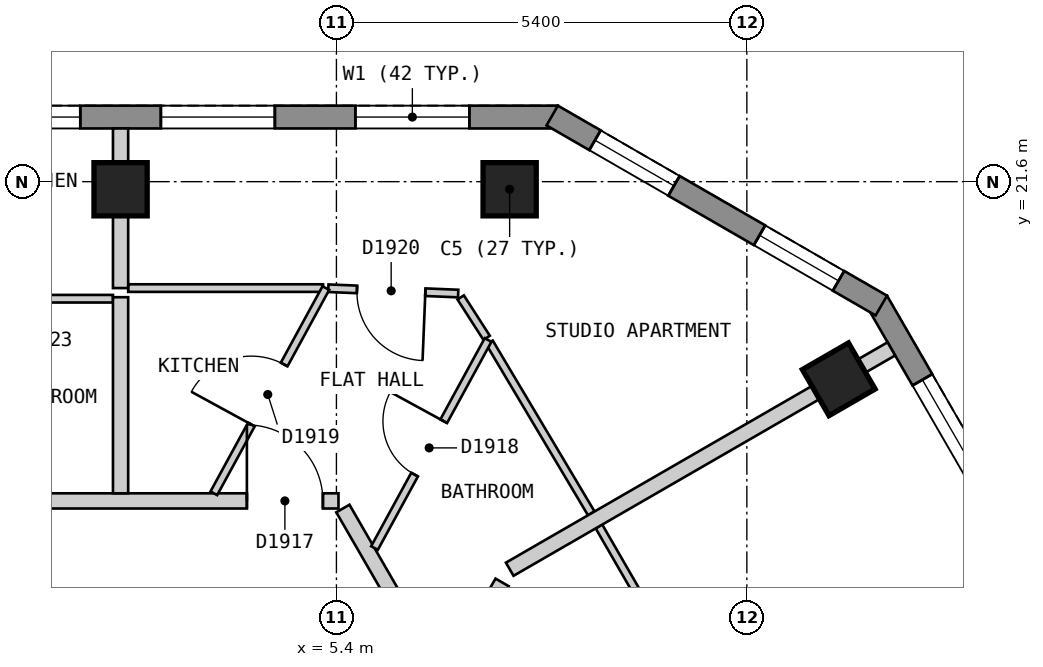
"""IFC4 building model, lengths in metres.
Left out: names, types, materials, properties, quantities, classifications, styles, units other than length and angle.
Written with IfcOpenShell. Run it as: python <this file> out.ifc"""

import sys

from ifc_helpers import new_model, si_unit, direction, frame, frame_2d, origin, origin_2d, place, context, subcontext, project, spatial, polyline, rectangle, outline, extrude, element, fill, save


model = new_model("IFC4")
c1 = context("Model", 3, precision=1e-05, world=origin(), true_north=direction((0.0, 1.0)))
c2 = subcontext(c1, "Body", "Model", "MODEL_VIEW")
j1 = project(units=[si_unit("LENGTHUNIT", "METRE"), si_unit("PLANEANGLEUNIT", "RADIAN")], contexts=[c1])
p1 = place(None, origin())
s1 = spatial("IfcSite", under=j1, at=p1, CompositionType="ELEMENT")
p2 = place(p1, origin())
s2 = spatial("IfcBuilding", under=s1, at=p2, CompositionType="ELEMENT")
p3 = place(p2, frame((0.0, 0.0, 226.8)))
s3 = spatial("IfcBuildingStorey", under=s2, at=p3, CompositionType="ELEMENT", Elevation=226.8)
for number, where, z_axis, x_axis in (
    (1, (7.679, 21.5, 0.0), (0.0, 0.0, 1.0), (-1.0, 0.0, 0.0)),
    (2, (2.56, 21.5, 0.0), (0.0, 0.0, 1.0), (-1.0, 0.0, 0.0)),
    (3, (12.009, 19.0, 0.0), (0.0, 0.0, 1.0), (-0.5, 0.866, 0.0)),
):
    element("IfcColumn", number, at=place(p3, frame(where, z_axis=z_axis, x_axis=x_axis)), inside=s3, PredefinedType="COLUMN", context=c2, shape_type="SweptSolid", body=[
        extrude(rectangle(XDim=0.7, YDim=0.7, at=origin_2d()), origin(), (0.0, 0.0, 1.0), 3.0),
    ])
p4 = place(p3, frame((8.314, 22.45, 0.0), z_axis=(0.0, 0.0, 1.0), x_axis=(-1.0, 0.0, 0.0)))
e4 = element("IfcWall", 4, at=p4, inside=s3, PredefinedType="SOLIDWALL", context=c2, shape_type="SweptSolid", body=[
    extrude(outline(polyline([(0.0, -0.15), (16.628, -0.15), (16.548, 0.15), (0.08, 0.15), (0.0, -0.15)])), origin(), (0.0, 0.0, 1.0), 2.7),
])
p5 = place(p4, frame((1.165, 0.0, 0.15)))
e5 = element("IfcOpeningElement", 5, at=p5, cuts=e4, PredefinedType="OPENING", context=c2, shape_type="SweptSolid", body=[
    extrude(rectangle(XDim=1.5, YDim=2.1, at=frame_2d((0.75, 1.05))), frame((0.0, 0.16, 0.0), z_axis=(0.0, -1.0, 0.0), x_axis=(1.0, 0.0, 0.0)), (0.0, 0.0, 1.0), 0.32),
])
p6 = place(p4, frame((3.724, 0.0, 0.15)))
e6 = element("IfcOpeningElement", 6, at=p6, cuts=e4, PredefinedType="OPENING", context=c2, shape_type="SweptSolid", body=[
    extrude(rectangle(XDim=1.5, YDim=2.1, at=frame_2d((0.75, 1.05))), frame((0.0, 0.16, 0.0), z_axis=(0.0, -1.0, 0.0), x_axis=(1.0, 0.0, 0.0)), (0.0, 0.0, 1.0), 0.32),
])
p7 = place(p4, frame((6.284, 0.0, 0.15)))
e7 = element("IfcOpeningElement", 7, at=p7, cuts=e4, PredefinedType="OPENING", context=c2, shape_type="SweptSolid", body=[
    extrude(rectangle(XDim=1.5, YDim=2.1, at=frame_2d((0.75, 1.05))), frame((0.0, 0.16, 0.0), z_axis=(0.0, -1.0, 0.0), x_axis=(1.0, 0.0, 0.0)), (0.0, 0.0, 1.0), 0.32),
])
p8 = place(p4, frame((8.843, 0.0, 0.15)))
e8 = element("IfcOpeningElement", 8, at=p8, cuts=e4, PredefinedType="OPENING", context=c2, shape_type="SweptSolid", body=[
    extrude(rectangle(XDim=1.5, YDim=2.1, at=frame_2d((0.75, 1.05))), frame((0.0, 0.16, 0.0), z_axis=(0.0, -1.0, 0.0), x_axis=(1.0, 0.0, 0.0)), (0.0, 0.0, 1.0), 0.32),
])
p9 = place(p4, frame((11.403, 0.0, 0.15)))
e9 = element("IfcOpeningElement", 9, at=p9, cuts=e4, PredefinedType="OPENING", context=c2, shape_type="SweptSolid", body=[
    extrude(rectangle(XDim=1.5, YDim=2.1, at=frame_2d((0.75, 1.05))), frame((0.0, 0.16, 0.0), z_axis=(0.0, -1.0, 0.0), x_axis=(1.0, 0.0, 0.0)), (0.0, 0.0, 1.0), 0.32),
])
p10 = place(p4, frame((13.962, 0.0, 0.15)))
e10 = element("IfcOpeningElement", 10, at=p10, cuts=e4, PredefinedType="OPENING", context=c2, shape_type="SweptSolid", body=[
    extrude(rectangle(XDim=1.5, YDim=2.1, at=frame_2d((0.75, 1.05))), frame((0.0, 0.16, 0.0), z_axis=(0.0, -1.0, 0.0), x_axis=(1.0, 0.0, 0.0)), (0.0, 0.0, 1.0), 0.32),
])
p11 = place(p3, frame((23.599, 0.825, 0.0), z_axis=(0.0, 0.0, 1.0), x_axis=(-0.500003656944, 0.866023292436, 0.0)))
e11 = element("IfcWall", 11, at=p11, inside=s3, PredefinedType="SOLIDWALL", context=c2, shape_type="SweptSolid", body=[
    extrude(outline(polyline([(0.0, -0.15), (22.17, -0.15), (22.09, 0.15), (0.08, 0.15), (0.0, -0.15)])), origin(), (0.0, 0.0, 1.0), 2.7),
])
p12 = place(p11, frame((1.191, 0.0, 0.15)))
e12 = element("IfcOpeningElement", 12, at=p12, cuts=e11, PredefinedType="OPENING", context=c2, shape_type="SweptSolid", body=[
    extrude(rectangle(XDim=1.5, YDim=2.1, at=frame_2d((0.75, 1.05))), frame((0.0, 0.16, 0.0), z_axis=(0.0, -1.0, 0.0), x_axis=(1.0, 0.0, 0.0)), (0.0, 0.0, 1.0), 0.32),
])
p13 = place(p11, frame((3.804, 0.0, 0.15)))
e13 = element("IfcOpeningElement", 13, at=p13, cuts=e11, PredefinedType="OPENING", context=c2, shape_type="SweptSolid", body=[
    extrude(rectangle(XDim=1.5, YDim=2.1, at=frame_2d((0.75, 1.05))), frame((0.0, 0.16, 0.0), z_axis=(0.0, -1.0, 0.0), x_axis=(1.0, 0.0, 0.0)), (0.0, 0.0, 1.0), 0.32),
])
p14 = place(p11, frame((6.417, 0.0, 0.15)))
e14 = element("IfcOpeningElement", 14, at=p14, cuts=e11, PredefinedType="OPENING", context=c2, shape_type="SweptSolid", body=[
    extrude(rectangle(XDim=1.5, YDim=2.1, at=frame_2d((0.75, 1.05))), frame((0.0, 0.16, 0.0), z_axis=(0.0, -1.0, 0.0), x_axis=(1.0, 0.0, 0.0)), (0.0, 0.0, 1.0), 0.32),
])
p15 = place(p11, frame((9.029, 0.0, 0.15)))
e15 = element("IfcOpeningElement", 15, at=p15, cuts=e11, PredefinedType="OPENING", context=c2, shape_type="SweptSolid", body=[
    extrude(rectangle(XDim=1.5, YDim=2.1, at=frame_2d((0.75, 1.05))), frame((0.0, 0.16, 0.0), z_axis=(0.0, -1.0, 0.0), x_axis=(1.0, 0.0, 0.0)), (0.0, 0.0, 1.0), 0.32),
])
p16 = place(p11, frame((11.641, 0.0, 0.15)))
e16 = element("IfcOpeningElement", 16, at=p16, cuts=e11, PredefinedType="OPENING", context=c2, shape_type="SweptSolid", body=[
    extrude(rectangle(XDim=1.5, YDim=2.1, at=frame_2d((0.75, 1.05))), frame((0.0, 0.16, 0.0), z_axis=(0.0, -1.0, 0.0), x_axis=(1.0, 0.0, 0.0)), (0.0, 0.0, 1.0), 0.32),
])
p17 = place(p11, frame((14.254, 0.0, 0.15)))
e17 = element("IfcOpeningElement", 17, at=p17, cuts=e11, PredefinedType="OPENING", context=c2, shape_type="SweptSolid", body=[
    extrude(rectangle(XDim=1.5, YDim=2.1, at=frame_2d((0.75, 1.05))), frame((0.0, 0.16, 0.0), z_axis=(0.0, -1.0, 0.0), x_axis=(1.0, 0.0, 0.0)), (0.0, 0.0, 1.0), 0.32),
])
p18 = place(p11, frame((16.866, 0.0, 0.15)))
e18 = element("IfcOpeningElement", 18, at=p18, cuts=e11, PredefinedType="OPENING", context=c2, shape_type="SweptSolid", body=[
    extrude(rectangle(XDim=1.5, YDim=2.1, at=frame_2d((0.75, 1.05))), frame((0.0, 0.16, 0.0), z_axis=(0.0, -1.0, 0.0), x_axis=(1.0, 0.0, 0.0)), (0.0, 0.0, 1.0), 0.32),
])
p19 = place(p11, frame((19.479, 0.0, 0.15)))
e19 = element("IfcOpeningElement", 19, at=p19, cuts=e11, PredefinedType="OPENING", context=c2, shape_type="SweptSolid", body=[
    extrude(rectangle(XDim=1.5, YDim=2.1, at=frame_2d((0.75, 1.05))), frame((0.0, 0.16, 0.0), z_axis=(0.0, -1.0, 0.0), x_axis=(1.0, 0.0, 0.0)), (0.0, 0.0, 1.0), 0.32),
])
p20 = place(p3, frame((12.569, 19.97, 0.0), z_axis=(0.0, 0.0, 1.0), x_axis=(-0.866022959057, 0.500004234368, 0.0)))
e20 = element("IfcWall", 20, at=p20, inside=s3, PredefinedType="SOLIDWALL", context=c2, shape_type="SweptSolid", body=[
    extrude(outline(polyline([(0.0, -0.15), (5.0, -0.15), (4.92, 0.15), (0.08, 0.15), (0.0, -0.15)])), origin(), (0.0, 0.0, 1.0), 2.7),
])
p21 = place(p20, frame((0.65, 0.0, 0.15)))
e21 = element("IfcOpeningElement", 21, at=p21, cuts=e20, PredefinedType="OPENING", context=c2, shape_type="SweptSolid", body=[
    extrude(rectangle(XDim=1.2, YDim=2.1, at=frame_2d((0.6, 1.05))), frame((0.0, 0.16, 0.0), z_axis=(0.0, -1.0, 0.0), x_axis=(1.0, 0.0, 0.0)), (0.0, 0.0, 1.0), 0.32),
])
p22 = place(p20, frame((3.15, 0.0, 0.15)))
e22 = element("IfcOpeningElement", 22, at=p22, cuts=e20, PredefinedType="OPENING", context=c2, shape_type="SweptSolid", body=[
    extrude(rectangle(XDim=1.2, YDim=2.1, at=frame_2d((0.6, 1.05))), frame((0.0, 0.16, 0.0), z_axis=(0.0, -1.0, 0.0), x_axis=(1.0, 0.0, 0.0)), (0.0, 0.0, 1.0), 0.32),
])
p23 = place(p3, frame((5.485, 17.3, 0.0), z_axis=(0.0, 0.0, 1.0), x_axis=(0.499943285704, -0.866058145322, 0.0)))
e23 = element("IfcWall", 23, at=p23, inside=s3, PredefinedType="PARTITIONING", context=c2, shape_type="SweptSolid", body=[
    extrude(rectangle(XDim=10.623, YDim=0.2, at=frame_2d((5.312, 0.0))), origin(), (0.0, 0.0, 1.0), 2.7),
])
p24 = place(p23, frame((3.901, 0.0, 0.0)))
e24 = element("IfcOpeningElement", 24, at=p24, cuts=e23, PredefinedType="OPENING", context=c2, shape_type="SweptSolid", body=[
    extrude(rectangle(XDim=1.0, YDim=2.1, at=frame_2d((0.5, 1.05))), frame((0.0, 0.11, 0.0), z_axis=(0.0, -1.0, 0.0), x_axis=(1.0, 0.0, 0.0)), (0.0, 0.0, 1.0), 0.22),
])
p25 = place(p3, frame((-5.312, 17.4, 0.0), z_axis=(0.0, 0.0, 1.0), x_axis=(1.0, 0.0, 0.0)))
e25 = element("IfcWall", 25, at=p25, inside=s3, PredefinedType="PARTITIONING", context=c2, shape_type="SweptSolid", body=[
    extrude(rectangle(XDim=10.739, YDim=0.2, at=frame_2d((5.37, 0.0))), origin(), (0.0, 0.0, 1.0), 2.7),
])
p26 = place(p25, frame((9.534, 0.0, 0.0)))
e26 = element("IfcOpeningElement", 26, at=p26, cuts=e25, PredefinedType="OPENING", context=c2, shape_type="SweptSolid", body=[
    extrude(rectangle(XDim=1.0, YDim=2.1, at=frame_2d((0.5, 1.05))), frame((0.0, 0.11, 0.0), z_axis=(0.0, -1.0, 0.0), x_axis=(1.0, 0.0, 0.0)), (0.0, 0.0, 1.0), 0.22),
])
p27 = place(p25, frame((4.812, 0.0, 0.0)))
e27 = element("IfcOpeningElement", 27, at=p27, cuts=e25, PredefinedType="OPENING", context=c2, shape_type="SweptSolid", body=[
    extrude(rectangle(XDim=1.0, YDim=2.1, at=frame_2d((0.5, 1.05))), frame((0.0, 0.11, 0.0), z_axis=(0.0, -1.0, 0.0), x_axis=(1.0, 0.0, 0.0)), (0.0, 0.0, 1.0), 0.22),
])
p28 = place(p25, frame((0.208, 0.0, 0.0)))
e28 = element("IfcOpeningElement", 28, at=p28, cuts=e25, PredefinedType="OPENING", context=c2, shape_type="SweptSolid", body=[
    extrude(rectangle(XDim=0.8, YDim=2.1, at=frame_2d((0.4, 1.05))), frame((0.0, 0.11, 0.0), z_axis=(0.0, -1.0, 0.0), x_axis=(1.0, 0.0, 0.0)), (0.0, 0.0, 1.0), 0.22),
])
p29 = place(p3, frame((7.035, 20.077, 0.0), z_axis=(0.0, 0.0, 1.0), x_axis=(0.540425167977, -0.841392083286, 0.0)))
e29 = element("IfcWall", 29, at=p29, inside=s3, PredefinedType="PARTITIONING", context=c2, shape_type="SweptSolid", body=[
    extrude(rectangle(XDim=0.631, YDim=0.1, at=frame_2d((0.315, 0.0))), origin(), (0.0, 0.0, 1.0), 2.7),
])
p30 = place(p3, frame((7.414, 19.484, 0.0), z_axis=(0.0, 0.0, 1.0), x_axis=(0.511734837015, -0.859143443544, 0.0)))
e30 = element("IfcWall", 30, at=p30, inside=s3, PredefinedType="PARTITIONING", context=c2, shape_type="SweptSolid", body=[
    extrude(rectangle(XDim=2.616, YDim=0.1, at=frame_2d((1.308, 0.0))), origin(), (0.0, 0.0, 1.0), 2.7),
])
p31 = place(p3, frame((8.854, 17.064, 0.0), z_axis=(0.0, 0.0, 1.0), x_axis=(0.500042049778, -0.866001124973, 0.0)))
e31 = element("IfcWall", 31, at=p31, inside=s3, PredefinedType="PARTITIONING", context=c2, shape_type="SweptSolid", body=[
    extrude(rectangle(XDim=5.025, YDim=0.1, at=frame_2d((2.513, 0.0))), origin(), (0.0, 0.0, 1.0), 2.7),
])
p32 = place(p31, frame((2.063, 0.0, 0.0)))
e32 = element("IfcOpeningElement", 32, at=p32, cuts=e31, PredefinedType="OPENING", context=c2, shape_type="SweptSolid", body=[
    extrude(rectangle(XDim=0.9, YDim=2.1, at=frame_2d((0.45, 1.05))), frame((0.0, 0.06, 0.0), z_axis=(0.0, -1.0, 0.0), x_axis=(1.0, 0.0, 0.0)), (0.0, 0.0, 1.0), 0.12),
])
p33 = place(p3, frame((5.294, 20.198, 0.0), z_axis=(0.0, 0.0, 1.0), x_axis=(0.999159599203, -0.040988965834, 0.0)))
e33 = element("IfcWall", 33, at=p33, inside=s3, PredefinedType="PARTITIONING", context=c2, shape_type="SweptSolid", body=[
    extrude(rectangle(XDim=1.709, YDim=0.1, at=frame_2d((0.855, 0.0))), origin(), (0.0, 0.0, 1.0), 2.7),
])
p34 = place(p33, frame((0.377, 0.0, 0.0)))
e34 = element("IfcOpeningElement", 34, at=p34, cuts=e33, PredefinedType="OPENING", context=c2, shape_type="SweptSolid", body=[
    extrude(rectangle(XDim=0.9, YDim=2.1, at=frame_2d((0.45, 1.05))), frame((0.0, 0.06, 0.0), z_axis=(0.0, -1.0, 0.0), x_axis=(1.0, 0.0, 0.0)), (0.0, 0.0, 1.0), 0.12),
])
p35 = place(p3, frame((-0.716, 20.06, 0.0), z_axis=(0.0, 0.0, 1.0), x_axis=(1.0, 0.0, 0.0)))
e35 = element("IfcWall", 35, at=p35, inside=s3, PredefinedType="PARTITIONING", context=c2, shape_type="SweptSolid", body=[
    extrude(rectangle(XDim=3.176, YDim=0.1, at=frame_2d((1.588, 0.0))), origin(), (0.0, 0.0, 1.0), 2.7),
])
p36 = place(p3, frame((2.66, 20.2, 0.0), z_axis=(0.0, 0.0, 1.0), x_axis=(1.0, 0.0, 0.0)))
e36 = element("IfcWall", 36, at=p36, inside=s3, PredefinedType="PARTITIONING", context=c2, shape_type="SweptSolid", body=[
    extrude(rectangle(XDim=2.564, YDim=0.1, at=frame_2d((1.282, 0.0))), origin(), (0.0, 0.0, 1.0), 2.7),
])
p37 = place(p3, frame((3.787, 17.5, 0.0), z_axis=(0.0, 0.0, 1.0), x_axis=(0.479146828267, 0.877734764585, 0.0)))
e37 = element("IfcWall", 37, at=p37, inside=s3, PredefinedType="PARTITIONING", context=c2, shape_type="SweptSolid", body=[
    extrude(rectangle(XDim=3.076, YDim=0.1, at=frame_2d((1.538, 0.0))), origin(), (0.0, 0.0, 1.0), 2.7),
])
p38 = place(p37, frame((1.031, 0.0, 0.0)))
e38 = element("IfcOpeningElement", 38, at=p38, cuts=e37, PredefinedType="OPENING", context=c2, shape_type="SweptSolid", body=[
    extrude(rectangle(XDim=0.9, YDim=2.1, at=frame_2d((0.45, 1.05))), frame((0.0, 0.06, 0.0), z_axis=(0.0, -1.0, 0.0), x_axis=(1.0, 0.0, 0.0)), (0.0, 0.0, 1.0), 0.12),
])
p39 = place(p3, frame((5.901, 16.78, 0.0), z_axis=(0.0, 0.0, 1.0), x_axis=(0.479148317257, 0.877733951759, 0.0)))
e39 = element("IfcWall", 39, at=p39, inside=s3, PredefinedType="PARTITIONING", context=c2, shape_type="SweptSolid", body=[
    extrude(rectangle(XDim=3.118, YDim=0.1, at=frame_2d((1.559, 0.0))), origin(), (0.0, 0.0, 1.0), 2.7),
])
p40 = place(p39, frame((1.101, 0.0, 0.0)))
e40 = element("IfcOpeningElement", 40, at=p40, cuts=e39, PredefinedType="OPENING", context=c2, shape_type="SweptSolid", body=[
    extrude(rectangle(XDim=0.8, YDim=2.1, at=frame_2d((0.4, 1.05))), frame((0.0, 0.06, 0.0), z_axis=(0.0, -1.0, 0.0), x_axis=(1.0, 0.0, 0.0)), (0.0, 0.0, 1.0), 0.12),
])
p41 = place(p3, frame((2.56, 20.08, 0.0), z_axis=(0.0, 0.0, 1.0), x_axis=(0.0, -1.0, 0.0)))
e41 = element("IfcWall", 41, at=p41, inside=s3, PredefinedType="PARTITIONING", context=c2, shape_type="SweptSolid", body=[
    extrude(rectangle(XDim=2.58, YDim=0.2, at=frame_2d((1.29, 0.0))), origin(), (0.0, 0.0, 1.0), 2.7),
])
p42 = place(p3, frame((6.871, 15.1, 0.0), z_axis=(0.0, 0.0, 1.0), x_axis=(0.50006528296, 0.865987709369, 0.0)))
e42 = element("IfcWall", 42, at=p42, inside=s3, PredefinedType="PARTITIONING", context=c2, shape_type="SweptSolid", body=[
    extrude(rectangle(XDim=1.418, YDim=0.2, at=frame_2d((0.709, 0.0))), origin(), (0.0, 0.0, 1.0), 2.7),
])
p43 = place(p3, frame((2.56, 20.2, 0.0), z_axis=(0.0, 0.0, 1.0), x_axis=(0.0, 1.0, 0.0)))
e43 = element("IfcWall", 43, at=p43, inside=s3, PredefinedType="PARTITIONING", context=c2, shape_type="SweptSolid", body=[
    extrude(rectangle(XDim=2.1, YDim=0.2, at=frame_2d((1.05, 0.0))), origin(), (0.0, 0.0, 1.0), 2.7),
])
p44 = place(p3, frame((7.68, 16.501, 0.0), z_axis=(0.0, 0.0, 1.0), x_axis=(0.86602149507, 0.500006770031, 0.0)))
e44 = element("IfcWall", 44, at=p44, inside=s3, PredefinedType="PARTITIONING", context=c2, shape_type="SweptSolid", body=[
    extrude(rectangle(XDim=5.798, YDim=0.2, at=frame_2d((2.899, 0.0))), origin(), (0.0, 0.0, 1.0), 2.7),
])
p45 = place(p5, origin())
e45 = element("IfcWindow", 45, at=p45, inside=s3, PartitioningType="SINGLE_PANEL", PredefinedType="WINDOW", context=c2, shape_type="SweptSolid", body=[
    extrude(rectangle(XDim=1.5, YDim=2.1, at=frame_2d((0.75, 1.05))), frame((0.0, 0.03, 0.0), z_axis=(0.0, -1.0, 0.0), x_axis=(1.0, 0.0, 0.0)), (0.0, 0.0, 1.0), 0.06),
])
fill(e5, e45)
p46 = place(p6, origin())
e46 = element("IfcWindow", 46, at=p46, inside=s3, PartitioningType="SINGLE_PANEL", PredefinedType="WINDOW", context=c2, shape_type="SweptSolid", body=[
    extrude(rectangle(XDim=1.5, YDim=2.1, at=frame_2d((0.75, 1.05))), frame((0.0, 0.03, 0.0), z_axis=(0.0, -1.0, 0.0), x_axis=(1.0, 0.0, 0.0)), (0.0, 0.0, 1.0), 0.06),
])
fill(e6, e46)
p47 = place(p7, origin())
e47 = element("IfcWindow", 47, at=p47, inside=s3, PartitioningType="SINGLE_PANEL", PredefinedType="WINDOW", context=c2, shape_type="SweptSolid", body=[
    extrude(rectangle(XDim=1.5, YDim=2.1, at=frame_2d((0.75, 1.05))), frame((0.0, 0.03, 0.0), z_axis=(0.0, -1.0, 0.0), x_axis=(1.0, 0.0, 0.0)), (0.0, 0.0, 1.0), 0.06),
])
fill(e7, e47)
p48 = place(p19, origin())
e48 = element("IfcWindow", 48, at=p48, inside=s3, PartitioningType="SINGLE_PANEL", PredefinedType="WINDOW", context=c2, shape_type="SweptSolid", body=[
    extrude(rectangle(XDim=1.5, YDim=2.1, at=frame_2d((0.75, 1.05))), frame((0.0, 0.03, 0.0), z_axis=(0.0, -1.0, 0.0), x_axis=(1.0, 0.0, 0.0)), (0.0, 0.0, 1.0), 0.06),
])
fill(e19, e48)
p49 = place(p21, origin())
e49 = element("IfcWindow", 49, at=p49, inside=s3, PartitioningType="SINGLE_PANEL", PredefinedType="WINDOW", context=c2, shape_type="SweptSolid", body=[
    extrude(rectangle(XDim=1.2, YDim=2.1, at=frame_2d((0.6, 1.05))), frame((0.0, 0.03, 0.0), z_axis=(0.0, -1.0, 0.0), x_axis=(1.0, 0.0, 0.0)), (0.0, 0.0, 1.0), 0.06),
])
fill(e21, e49)
p50 = place(p22, origin())
e50 = element("IfcWindow", 50, at=p50, inside=s3, PartitioningType="SINGLE_PANEL", PredefinedType="WINDOW", context=c2, shape_type="SweptSolid", body=[
    extrude(rectangle(XDim=1.2, YDim=2.1, at=frame_2d((0.6, 1.05))), frame((0.0, 0.03, 0.0), z_axis=(0.0, -1.0, 0.0), x_axis=(1.0, 0.0, 0.0)), (0.0, 0.0, 1.0), 0.06),
])
fill(e22, e50)
p51 = place(p26, origin())
e51 = element("IfcDoor", 51, at=p51, inside=s3, OperationType="SINGLE_SWING_LEFT", PredefinedType="DOOR", context=c2, shape_type="SweptSolid", body=[
    extrude(rectangle(XDim=1.0, YDim=2.1, at=frame_2d((0.5, 1.05))), frame((0.0, 0.025, 0.0), z_axis=(0.0, -1.0, 0.0), x_axis=(1.0, 0.0, 0.0)), (0.0, 0.0, 1.0), 0.05),
])
fill(e26, e51)
p52 = place(p40, origin())
e52 = element("IfcDoor", 52, at=p52, inside=s3, OperationType="SINGLE_SWING_RIGHT", PredefinedType="DOOR", context=c2, shape_type="SweptSolid", body=[
    extrude(rectangle(XDim=0.8, YDim=2.1, at=frame_2d((0.4, 1.05))), frame((0.0, 0.025, 0.0), z_axis=(0.0, -1.0, 0.0), x_axis=(1.0, 0.0, 0.0)), (0.0, 0.0, 1.0), 0.05),
])
fill(e40, e52)
p53 = place(p38, origin())
e53 = element("IfcDoor", 53, at=p53, inside=s3, OperationType="SINGLE_SWING_LEFT", PredefinedType="DOOR", context=c2, shape_type="SweptSolid", body=[
    extrude(rectangle(XDim=0.9, YDim=2.1, at=frame_2d((0.45, 1.05))), frame((0.0, 0.025, 0.0), z_axis=(0.0, -1.0, 0.0), x_axis=(1.0, 0.0, 0.0)), (0.0, 0.0, 1.0), 0.05),
])
fill(e38, e53)
p54 = place(p34, origin())
e54 = element("IfcDoor", 54, at=p54, inside=s3, OperationType="SINGLE_SWING_RIGHT", PredefinedType="DOOR", context=c2, shape_type="SweptSolid", body=[
    extrude(rectangle(XDim=0.9, YDim=2.1, at=frame_2d((0.45, 1.05))), frame((0.0, 0.025, 0.0), z_axis=(0.0, -1.0, 0.0), x_axis=(1.0, 0.0, 0.0)), (0.0, 0.0, 1.0), 0.05),
])
fill(e34, e54)
save(model, sys.argv[1])
